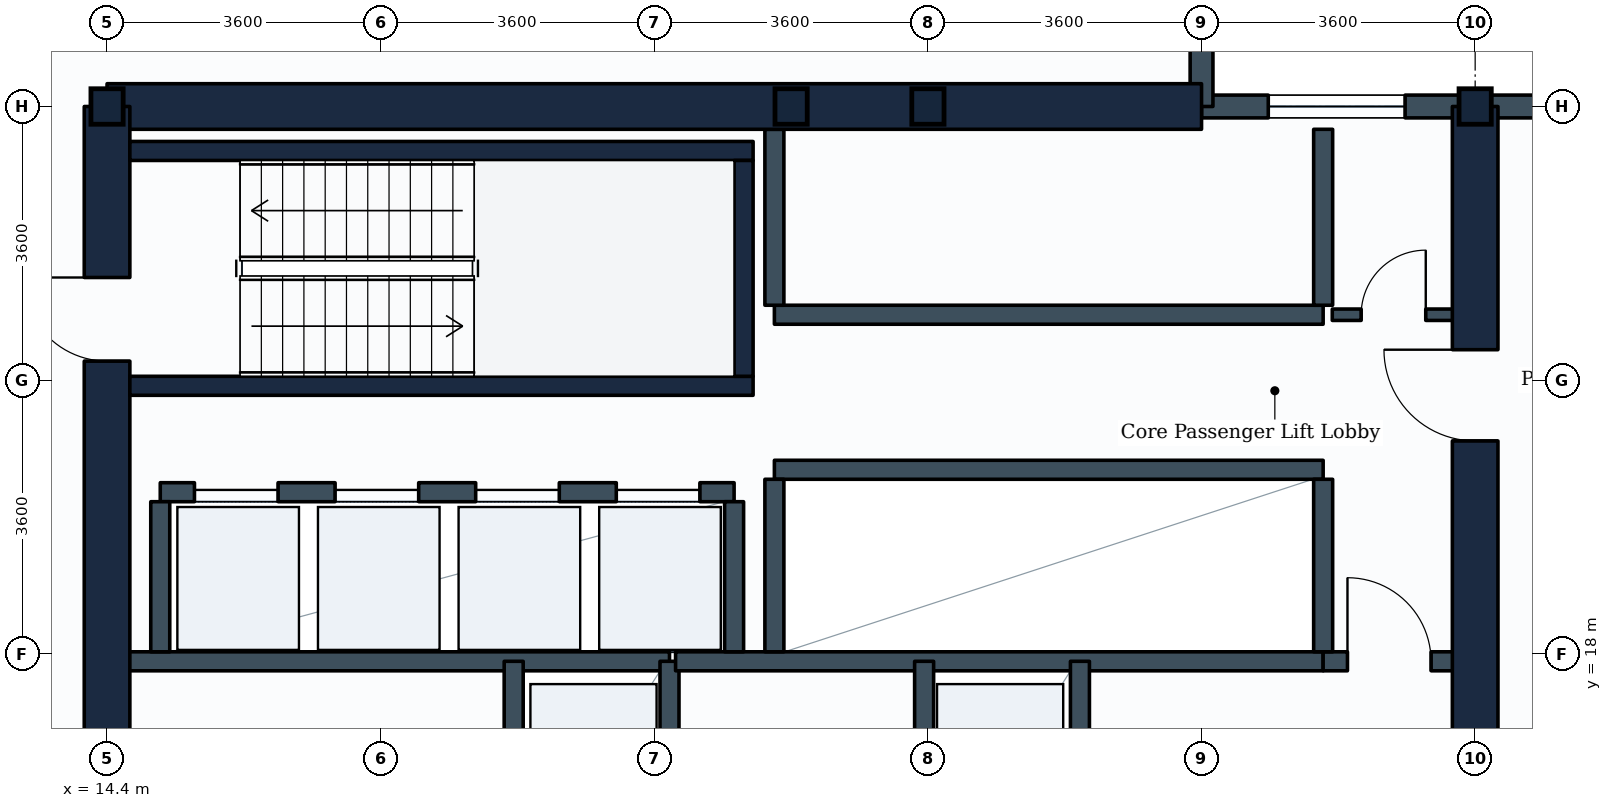
"""IFC4 building model, lengths in metres.
Left out: names, types, materials, properties, quantities, classifications, styles, units other than length and angle.
Written with IfcOpenShell. Run it as: python <this file> out.ifc"""

import sys

from ifc_helpers import new_model, si_unit, direction, frame, frame_2d, origin, origin_2d, place, context, subcontext, project, spatial, rectangle, i_section, extrude, element, fill, save


model = new_model("IFC4")
c1 = context("Model", 3, precision=1e-05, world=origin(), true_north=direction((0.0, 1.0)))
c2 = subcontext(c1, "Body", "Model", "MODEL_VIEW")
j1 = project(units=[si_unit("LENGTHUNIT", "METRE"), si_unit("PLANEANGLEUNIT", "RADIAN")], contexts=[c1])
p1 = place(None, origin())
s1 = spatial("IfcSite", under=j1, at=p1, CompositionType="ELEMENT")
p2 = place(p1, origin())
s2 = spatial("IfcBuilding", under=s1, at=p2, CompositionType="ELEMENT")
p3 = place(p2, frame((0.0, 0.0, 63.0)))
s3 = spatial("IfcBuildingStorey", under=s2, at=p3, CompositionType="ELEMENT", Elevation=63.0)
for number, where, z_axis, x_axis in (
    (1, (14.4, 25.2, 0.0), (0.0, 0.0, 1.0), (1.0, 0.0, 0.0)),
    (2, (23.4, 25.2, 0.0), (0.0, 0.0, 1.0), (1.0, 0.0, 0.0)),
    (3, (25.2, 25.2, 0.0), (0.0, 0.0, 1.0), (1.0, 0.0, 0.0)),
    (4, (32.4, 25.2, 0.0), (0.0, 0.0, 1.0), (1.0, 0.0, 0.0)),
):
    element("IfcColumn", number, at=place(p3, frame(where, z_axis=z_axis, x_axis=x_axis)), inside=s3, PredefinedType="COLUMN", context=c2, shape_type="SweptSolid", body=[
        extrude(i_section(OverallWidth=0.424, OverallDepth=0.467, WebThickness=0.033, FlangeThickness=0.053, FilletRadius=0.015, at=origin_2d()), origin(), (0.0, 0.0, 1.0), 3.9),
    ])
p4 = place(p3, frame((32.4, 25.2, 0.0), z_axis=(0.0, 0.0, 1.0), x_axis=(1.0, 0.0, 0.0)))
e5 = element("IfcWall", 5, at=p4, inside=s3, PredefinedType="STANDARD", context=c2, shape_type="SweptSolid", body=[
    extrude(rectangle(XDim=3.6, YDim=0.3, at=frame_2d((1.8, 0.0))), origin(), (0.0, 0.0, 1.0), 2.93),
])
p5 = place(p3, frame((28.8, 25.2, 0.0), z_axis=(0.0, 0.0, 1.0), x_axis=(1.0, 0.0, 0.0)))
e6 = element("IfcWall", 6, at=p5, inside=s3, PredefinedType="STANDARD", context=c2, shape_type="SweptSolid", body=[
    extrude(rectangle(XDim=3.6, YDim=0.3, at=frame_2d((1.8, 0.0))), origin(), (0.0, 0.0, 1.0), 3.635),
])
p6 = place(p5, frame((0.878, 0.0, 0.85)))
e7 = element("IfcOpeningElement", 7, at=p6, cuts=e6, PredefinedType="OPENING", context=c2, shape_type="SweptSolid", body=[
    extrude(rectangle(XDim=1.8, YDim=1.35, at=frame_2d((0.9, 0.675))), frame((0.0, 0.16, 0.0), z_axis=(0.0, -1.0, 0.0), x_axis=(1.0, 0.0, 0.0)), (0.0, 0.0, 1.0), 0.32),
])
p7 = place(p3, frame((28.8, 25.2, 0.0), z_axis=(0.0, 0.0, 1.0), x_axis=(0.0, 1.0, 0.0)))
e8 = element("IfcWall", 8, at=p7, inside=s3, PredefinedType="STANDARD", context=c2, shape_type="SweptSolid", body=[
    extrude(rectangle(XDim=3.6, YDim=0.3, at=frame_2d((1.8, 0.0))), origin(), (0.0, 0.0, 1.0), 3.14),
])
p8 = place(p3, frame((14.4, 25.2, 0.0), z_axis=(0.0, 0.0, 1.0), x_axis=(1.0, 0.0, 0.0)))
e9 = element("IfcWall", 9, at=p8, inside=s3, PredefinedType="SHEAR", context=c2, shape_type="SweptSolid", body=[
    extrude(rectangle(XDim=14.4, YDim=0.6, at=frame_2d((7.2, 0.0))), origin(), (0.0, 0.0, 1.0), 3.65),
])
p9 = place(p3, frame((14.4, 10.8, 0.0), z_axis=(0.0, 0.0, 1.0), x_axis=(0.0, 1.0, 0.0)))
e10 = element("IfcWall", 10, at=p9, inside=s3, PredefinedType="SHEAR", context=c2, shape_type="SweptSolid", body=[
    extrude(rectangle(XDim=14.4, YDim=0.6, at=frame_2d((7.2, 0.0))), origin(), (0.0, 0.0, 1.0), 3.65),
])
p10 = place(p9, frame((11.05, 0.0, 0.0)))
e11 = element("IfcOpeningElement", 11, at=p10, cuts=e10, PredefinedType="OPENING", context=c2, shape_type="SweptSolid", body=[
    extrude(rectangle(XDim=1.1, YDim=2.1, at=frame_2d((0.55, 1.05))), frame((0.0, 0.31, 0.0), z_axis=(0.0, -1.0, 0.0), x_axis=(1.0, 0.0, 0.0)), (0.0, 0.0, 1.0), 0.62),
])
p11 = place(p9, frame((4.9, 0.0, 0.0)))
e12 = element("IfcOpeningElement", 12, at=p11, cuts=e10, PredefinedType="OPENING", context=c2, shape_type="SweptSolid", body=[
    extrude(rectangle(XDim=1.2, YDim=2.1, at=frame_2d((0.6, 1.05))), frame((0.0, 0.31, 0.0), z_axis=(0.0, -1.0, 0.0), x_axis=(1.0, 0.0, 0.0)), (0.0, 0.0, 1.0), 0.62),
])
p12 = place(p3, frame((32.4, 10.8, 0.0), z_axis=(0.0, 0.0, 1.0), x_axis=(0.0, 1.0, 0.0)))
e13 = element("IfcWall", 13, at=p12, inside=s3, PredefinedType="SHEAR", context=c2, shape_type="SweptSolid", body=[
    extrude(rectangle(XDim=14.4, YDim=0.6, at=frame_2d((7.2, 0.0))), origin(), (0.0, 0.0, 1.0), 3.65),
])
p13 = place(p12, frame((4.35, 0.0, 0.0)))
e14 = element("IfcOpeningElement", 14, at=p13, cuts=e13, PredefinedType="OPENING", context=c2, shape_type="SweptSolid", body=[
    extrude(rectangle(XDim=1.2, YDim=2.1, at=frame_2d((0.6, 1.05))), frame((0.0, 0.31, 0.0), z_axis=(0.0, -1.0, 0.0), x_axis=(1.0, 0.0, 0.0)), (0.0, 0.0, 1.0), 0.62),
])
p14 = place(p12, frame((10.0, 0.0, 0.0)))
e15 = element("IfcOpeningElement", 15, at=p14, cuts=e13, PredefinedType="OPENING", context=c2, shape_type="SweptSolid", body=[
    extrude(rectangle(XDim=1.2, YDim=2.1, at=frame_2d((0.6, 1.05))), frame((0.0, 0.31, 0.0), z_axis=(0.0, -1.0, 0.0), x_axis=(1.0, 0.0, 0.0)), (0.0, 0.0, 1.0), 0.62),
])
for number, where, z_axis, x_axis in (
    (16, (14.7, 21.525, 0.0), (0.0, 0.0, 1.0), (1.0, 0.0, 0.0)),
    (17, (14.7, 24.615, 0.0), (0.0, 0.0, 1.0), (1.0, 0.0, 0.0)),
):
    element("IfcWall", number, at=place(p3, frame(where, z_axis=z_axis, x_axis=x_axis)), inside=s3, PredefinedType="SHEAR", context=c2, shape_type="SweptSolid", body=[
        extrude(rectangle(XDim=8.2, YDim=0.25, at=frame_2d((4.1, 0.0))), origin(), (0.0, 0.0, 1.0), 3.65),
    ])
p15 = place(p3, frame((22.775, 21.65, 0.0), z_axis=(0.0, 0.0, 1.0), x_axis=(0.0, 1.0, 0.0)))
e18 = element("IfcWall", 18, at=p15, inside=s3, PredefinedType="SHEAR", context=c2, shape_type="SweptSolid", body=[
    extrude(rectangle(XDim=2.84, YDim=0.25, at=frame_2d((1.42, 0.0))), origin(), (0.0, 0.0, 1.0), 3.65),
])
p16 = place(p3, frame((14.65, 17.9, 0.0), z_axis=(0.0, 0.0, 1.0), x_axis=(1.0, 0.0, 0.0)))
e19 = element("IfcWall", 19, at=p16, inside=s3, PredefinedType="PARTITIONING", context=c2, shape_type="SweptSolid", body=[
    extrude(rectangle(XDim=7.15, YDim=0.25, at=frame_2d((3.575, 0.0))), origin(), (0.0, 0.0, 1.0), 3.635),
])
p17 = place(p3, frame((19.75, 14.84, 0.0), z_axis=(0.0, 0.0, 1.0), x_axis=(0.0, 1.0, 0.0)))
e20 = element("IfcWall", 20, at=p17, inside=s3, PredefinedType="PARTITIONING", context=c2, shape_type="SweptSolid", body=[
    extrude(rectangle(XDim=3.06, YDim=0.25, at=frame_2d((1.53, 0.0))), origin(), (0.0, 0.0, 1.0), 3.635),
])
p18 = place(p17, frame((0.98, 0.0, 0.0)))
e21 = element("IfcOpeningElement", 21, at=p18, cuts=e20, PredefinedType="OPENING", context=c2, shape_type="SweptSolid", body=[
    extrude(rectangle(XDim=1.1, YDim=2.1, at=frame_2d((0.55, 1.05))), frame((0.0, 0.135, 0.0), z_axis=(0.0, -1.0, 0.0), x_axis=(1.0, 0.0, 0.0)), (0.0, 0.0, 1.0), 0.27),
])
p19 = place(p3, frame((21.8, 14.84, 0.0), z_axis=(0.0, 0.0, 1.0), x_axis=(0.0, 1.0, 0.0)))
e22 = element("IfcWall", 22, at=p19, inside=s3, PredefinedType="PARTITIONING", context=c2, shape_type="SweptSolid", body=[
    extrude(rectangle(XDim=3.06, YDim=0.25, at=frame_2d((1.53, 0.0))), origin(), (0.0, 0.0, 1.0), 3.635),
])
p20 = place(p3, frame((21.88, 17.9, 0.0), z_axis=(0.0, 0.0, 1.0), x_axis=(1.0, 0.0, 0.0)))
e23 = element("IfcWall", 23, at=p20, inside=s3, PredefinedType="PARTITIONING", context=c2, shape_type="SweptSolid", body=[
    extrude(rectangle(XDim=8.52, YDim=0.25, at=frame_2d((4.26, 0.0))), origin(), (0.0, 0.0, 1.0), 3.635),
])
p21 = place(p3, frame((30.4, 17.9, 0.0), z_axis=(0.0, 0.0, 1.0), x_axis=(1.0, 0.0, 0.0)))
e24 = element("IfcWall", 24, at=p21, inside=s3, PredefinedType="PARTITIONING", context=c2, shape_type="SweptSolid", body=[
    extrude(rectangle(XDim=1.75, YDim=0.25, at=frame_2d((0.875, 0.0))), origin(), (0.0, 0.0, 1.0), 3.635),
])
p22 = place(p21, frame((0.32, 0.0, 0.0)))
e25 = element("IfcOpeningElement", 25, at=p22, cuts=e24, PredefinedType="OPENING", context=c2, shape_type="SweptSolid", body=[
    extrude(rectangle(XDim=1.1, YDim=2.1, at=frame_2d((0.55, 1.05))), frame((0.0, 0.135, 0.0), z_axis=(0.0, -1.0, 0.0), x_axis=(1.0, 0.0, 0.0)), (0.0, 0.0, 1.0), 0.27),
])
p23 = place(p3, frame((25.15, 14.84, 0.0), z_axis=(0.0, 0.0, 1.0), x_axis=(0.0, 1.0, 0.0)))
e26 = element("IfcWall", 26, at=p23, inside=s3, PredefinedType="PARTITIONING", context=c2, shape_type="SweptSolid", body=[
    extrude(rectangle(XDim=3.06, YDim=0.25, at=frame_2d((1.53, 0.0))), origin(), (0.0, 0.0, 1.0), 3.635),
])
p24 = place(p3, frame((27.2, 14.84, 0.0), z_axis=(0.0, 0.0, 1.0), x_axis=(0.0, 1.0, 0.0)))
e27 = element("IfcWall", 27, at=p24, inside=s3, PredefinedType="PARTITIONING", context=c2, shape_type="SweptSolid", body=[
    extrude(rectangle(XDim=3.06, YDim=0.25, at=frame_2d((1.53, 0.0))), origin(), (0.0, 0.0, 1.0), 3.635),
])
p25 = place(p24, frame((0.98, 0.0, 0.0)))
e28 = element("IfcOpeningElement", 28, at=p25, cuts=e27, PredefinedType="OPENING", context=c2, shape_type="SweptSolid", body=[
    extrude(rectangle(XDim=1.1, YDim=2.1, at=frame_2d((0.55, 1.05))), frame((0.0, 0.135, 0.0), z_axis=(0.0, -1.0, 0.0), x_axis=(1.0, 0.0, 0.0)), (0.0, 0.0, 1.0), 0.27),
])
p26 = place(p3, frame((15.1, 20.125, 0.0), z_axis=(0.0, 0.0, 1.0), x_axis=(1.0, 0.0, 0.0)))
e29 = element("IfcWall", 29, at=p26, inside=s3, PredefinedType="PARTITIONING", context=c2, shape_type="SweptSolid", body=[
    extrude(rectangle(XDim=7.55, YDim=0.25, at=frame_2d((3.775, 0.0))), origin(), (0.0, 0.0, 1.0), 3.635),
])
p27 = place(p26, frame((0.45, 0.0, 0.0)))
e30 = element("IfcOpeningElement", 30, at=p27, cuts=e29, PredefinedType="OPENING", context=c2, shape_type="SweptSolid", body=[
    extrude(rectangle(XDim=1.1, YDim=2.1, at=frame_2d((0.55, 1.05))), frame((0.0, 0.135, 0.0), z_axis=(0.0, -1.0, 0.0), x_axis=(1.0, 0.0, 0.0)), (0.0, 0.0, 1.0), 0.27),
])
p28 = place(p26, frame((2.3, 0.0, 0.0)))
e31 = element("IfcOpeningElement", 31, at=p28, cuts=e29, PredefinedType="OPENING", context=c2, shape_type="SweptSolid", body=[
    extrude(rectangle(XDim=1.1, YDim=2.1, at=frame_2d((0.55, 1.05))), frame((0.0, 0.135, 0.0), z_axis=(0.0, -1.0, 0.0), x_axis=(1.0, 0.0, 0.0)), (0.0, 0.0, 1.0), 0.27),
])
p29 = place(p26, frame((4.15, 0.0, 0.0)))
e32 = element("IfcOpeningElement", 32, at=p29, cuts=e29, PredefinedType="OPENING", context=c2, shape_type="SweptSolid", body=[
    extrude(rectangle(XDim=1.1, YDim=2.1, at=frame_2d((0.55, 1.05))), frame((0.0, 0.135, 0.0), z_axis=(0.0, -1.0, 0.0), x_axis=(1.0, 0.0, 0.0)), (0.0, 0.0, 1.0), 0.27),
])
p30 = place(p26, frame((6.0, 0.0, 0.0)))
e33 = element("IfcOpeningElement", 33, at=p30, cuts=e29, PredefinedType="OPENING", context=c2, shape_type="SweptSolid", body=[
    extrude(rectangle(XDim=1.1, YDim=2.1, at=frame_2d((0.55, 1.05))), frame((0.0, 0.135, 0.0), z_axis=(0.0, -1.0, 0.0), x_axis=(1.0, 0.0, 0.0)), (0.0, 0.0, 1.0), 0.27),
])
for number, where, z_axis, x_axis in (
    (34, (15.1, 18.025, 0.0), (0.0, 0.0, 1.0), (0.0, 1.0, 0.0)),
    (35, (22.65, 18.025, 0.0), (0.0, 0.0, 1.0), (0.0, 1.0, 0.0)),
):
    element("IfcWall", number, at=place(p3, frame(where, z_axis=z_axis, x_axis=x_axis)), inside=s3, PredefinedType="PARTITIONING", context=c2, shape_type="SweptSolid", body=[
        extrude(rectangle(XDim=1.975, YDim=0.25, at=frame_2d((0.988, 0.0))), origin(), (0.0, 0.0, 1.0), 3.635),
    ])
p31 = place(p3, frame((23.18, 20.42, 0.0), z_axis=(0.0, 0.0, 1.0), x_axis=(1.0, 0.0, 0.0)))
e36 = element("IfcWall", 36, at=p31, inside=s3, PredefinedType="PARTITIONING", context=c2, shape_type="SweptSolid", body=[
    extrude(rectangle(XDim=7.22, YDim=0.25, at=frame_2d((3.61, 0.0))), origin(), (0.0, 0.0, 1.0), 3.635),
])
for number, where, z_axis, x_axis in (
    (37, (23.18, 18.025, 0.0), (0.0, 0.0, 1.0), (0.0, 1.0, 0.0)),
    (38, (30.4, 18.025, 0.0), (0.0, 0.0, 1.0), (0.0, 1.0, 0.0)),
):
    element("IfcWall", number, at=place(p3, frame(where, z_axis=z_axis, x_axis=x_axis)), inside=s3, PredefinedType="PARTITIONING", context=c2, shape_type="SweptSolid", body=[
        extrude(rectangle(XDim=2.27, YDim=0.25, at=frame_2d((1.135, 0.0))), origin(), (0.0, 0.0, 1.0), 3.635),
    ])
p32 = place(p3, frame((23.18, 22.46, 0.0), z_axis=(0.0, 0.0, 1.0), x_axis=(1.0, 0.0, 0.0)))
e39 = element("IfcWall", 39, at=p32, inside=s3, PredefinedType="PARTITIONING", context=c2, shape_type="SweptSolid", body=[
    extrude(rectangle(XDim=7.22, YDim=0.25, at=frame_2d((3.61, 0.0))), origin(), (0.0, 0.0, 1.0), 3.635),
])
for number, where, z_axis, x_axis in (
    (40, (23.18, 22.585, 0.0), (0.0, 0.0, 1.0), (0.0, 1.0, 0.0)),
    (41, (30.4, 22.585, 0.0), (0.0, 0.0, 1.0), (0.0, 1.0, 0.0)),
):
    element("IfcWall", number, at=place(p3, frame(where, z_axis=z_axis, x_axis=x_axis)), inside=s3, PredefinedType="PARTITIONING", context=c2, shape_type="SweptSolid", body=[
        extrude(rectangle(XDim=2.315, YDim=0.25, at=frame_2d((1.157, 0.0))), origin(), (0.0, 0.0, 1.0), 3.635),
    ])
p33 = place(p3, frame((30.52, 22.46, 0.0), z_axis=(0.0, 0.0, 1.0), x_axis=(1.0, 0.0, 0.0)))
e42 = element("IfcWall", 42, at=p33, inside=s3, PredefinedType="PARTITIONING", context=c2, shape_type="SweptSolid", body=[
    extrude(rectangle(XDim=1.63, YDim=0.15, at=frame_2d((0.815, 0.0))), origin(), (0.0, 0.0, 1.0), 3.635),
])
p34 = place(p33, frame((0.38, 0.0, 0.0)))
e43 = element("IfcOpeningElement", 43, at=p34, cuts=e42, PredefinedType="OPENING", context=c2, shape_type="SweptSolid", body=[
    extrude(rectangle(XDim=0.85, YDim=2.1, at=frame_2d((0.425, 1.05))), frame((0.0, 0.085, 0.0), z_axis=(0.0, -1.0, 0.0), x_axis=(1.0, 0.0, 0.0)), (0.0, 0.0, 1.0), 0.17),
])
p35 = place(p6, origin())
e44 = element("IfcWindow", 44, at=p35, inside=s3, PartitioningType="SINGLE_PANEL", PredefinedType="WINDOW", context=c2, shape_type="SweptSolid", body=[
    extrude(rectangle(XDim=1.8, YDim=1.35, at=frame_2d((0.9, 0.675))), frame((0.0, 0.03, 0.0), z_axis=(0.0, -1.0, 0.0), x_axis=(1.0, 0.0, 0.0)), (0.0, 0.0, 1.0), 0.06),
])
fill(e7, e44)
p36 = place(p10, origin())
e45 = element("IfcDoor", 45, at=p36, inside=s3, OperationType="SINGLE_SWING_RIGHT", PredefinedType="DOOR", context=c2, shape_type="SweptSolid", body=[
    extrude(rectangle(XDim=1.1, YDim=2.1, at=frame_2d((0.55, 1.05))), frame((0.0, 0.025, 0.0), z_axis=(0.0, -1.0, 0.0), x_axis=(1.0, 0.0, 0.0)), (0.0, 0.0, 1.0), 0.05),
])
fill(e11, e45)
p37 = place(p22, origin())
e46 = element("IfcDoor", 46, at=p37, inside=s3, OperationType="SINGLE_SWING_LEFT", PredefinedType="DOOR", context=c2, shape_type="SweptSolid", body=[
    extrude(rectangle(XDim=1.1, YDim=2.1, at=frame_2d((0.55, 1.05))), frame((0.0, 0.025, 0.0), z_axis=(0.0, -1.0, 0.0), x_axis=(1.0, 0.0, 0.0)), (0.0, 0.0, 1.0), 0.05),
])
fill(e25, e46)
p38 = place(p27, origin())
e47 = element("IfcDoor", 47, at=p38, inside=s3, OperationType="SLIDING_TO_LEFT", PredefinedType="DOOR", context=c2, shape_type="SweptSolid", body=[
    extrude(rectangle(XDim=1.1, YDim=2.1, at=frame_2d((0.55, 1.05))), frame((0.0, 0.025, 0.0), z_axis=(0.0, -1.0, 0.0), x_axis=(1.0, 0.0, 0.0)), (0.0, 0.0, 1.0), 0.05),
])
fill(e30, e47)
p39 = place(p28, origin())
e48 = element("IfcDoor", 48, at=p39, inside=s3, OperationType="SLIDING_TO_LEFT", PredefinedType="DOOR", context=c2, shape_type="SweptSolid", body=[
    extrude(rectangle(XDim=1.1, YDim=2.1, at=frame_2d((0.55, 1.05))), frame((0.0, 0.025, 0.0), z_axis=(0.0, -1.0, 0.0), x_axis=(1.0, 0.0, 0.0)), (0.0, 0.0, 1.0), 0.05),
])
fill(e31, e48)
p40 = place(p29, origin())
e49 = element("IfcDoor", 49, at=p40, inside=s3, OperationType="SLIDING_TO_LEFT", PredefinedType="DOOR", context=c2, shape_type="SweptSolid", body=[
    extrude(rectangle(XDim=1.1, YDim=2.1, at=frame_2d((0.55, 1.05))), frame((0.0, 0.025, 0.0), z_axis=(0.0, -1.0, 0.0), x_axis=(1.0, 0.0, 0.0)), (0.0, 0.0, 1.0), 0.05),
])
fill(e32, e49)
p41 = place(p30, origin())
e50 = element("IfcDoor", 50, at=p41, inside=s3, OperationType="SLIDING_TO_LEFT", PredefinedType="DOOR", context=c2, shape_type="SweptSolid", body=[
    extrude(rectangle(XDim=1.1, YDim=2.1, at=frame_2d((0.55, 1.05))), frame((0.0, 0.025, 0.0), z_axis=(0.0, -1.0, 0.0), x_axis=(1.0, 0.0, 0.0)), (0.0, 0.0, 1.0), 0.05),
])
fill(e33, e50)
p42 = place(p14, origin())
e51 = element("IfcDoor", 51, at=p42, inside=s3, OperationType="SINGLE_SWING_RIGHT", PredefinedType="DOOR", context=c2, shape_type="SweptSolid", body=[
    extrude(rectangle(XDim=1.2, YDim=2.1, at=frame_2d((0.6, 1.05))), frame((0.0, 0.025, 0.0), z_axis=(0.0, -1.0, 0.0), x_axis=(1.0, 0.0, 0.0)), (0.0, 0.0, 1.0), 0.05),
])
fill(e15, e51)
p43 = place(p34, origin())
e52 = element("IfcDoor", 52, at=p43, inside=s3, OperationType="SINGLE_SWING_RIGHT", PredefinedType="DOOR", context=c2, shape_type="SweptSolid", body=[
    extrude(rectangle(XDim=0.85, YDim=2.1, at=frame_2d((0.425, 1.05))), frame((0.0, 0.025, 0.0), z_axis=(0.0, -1.0, 0.0), x_axis=(1.0, 0.0, 0.0)), (0.0, 0.0, 1.0), 0.05),
])
fill(e43, e52)
save(model, sys.argv[1])
